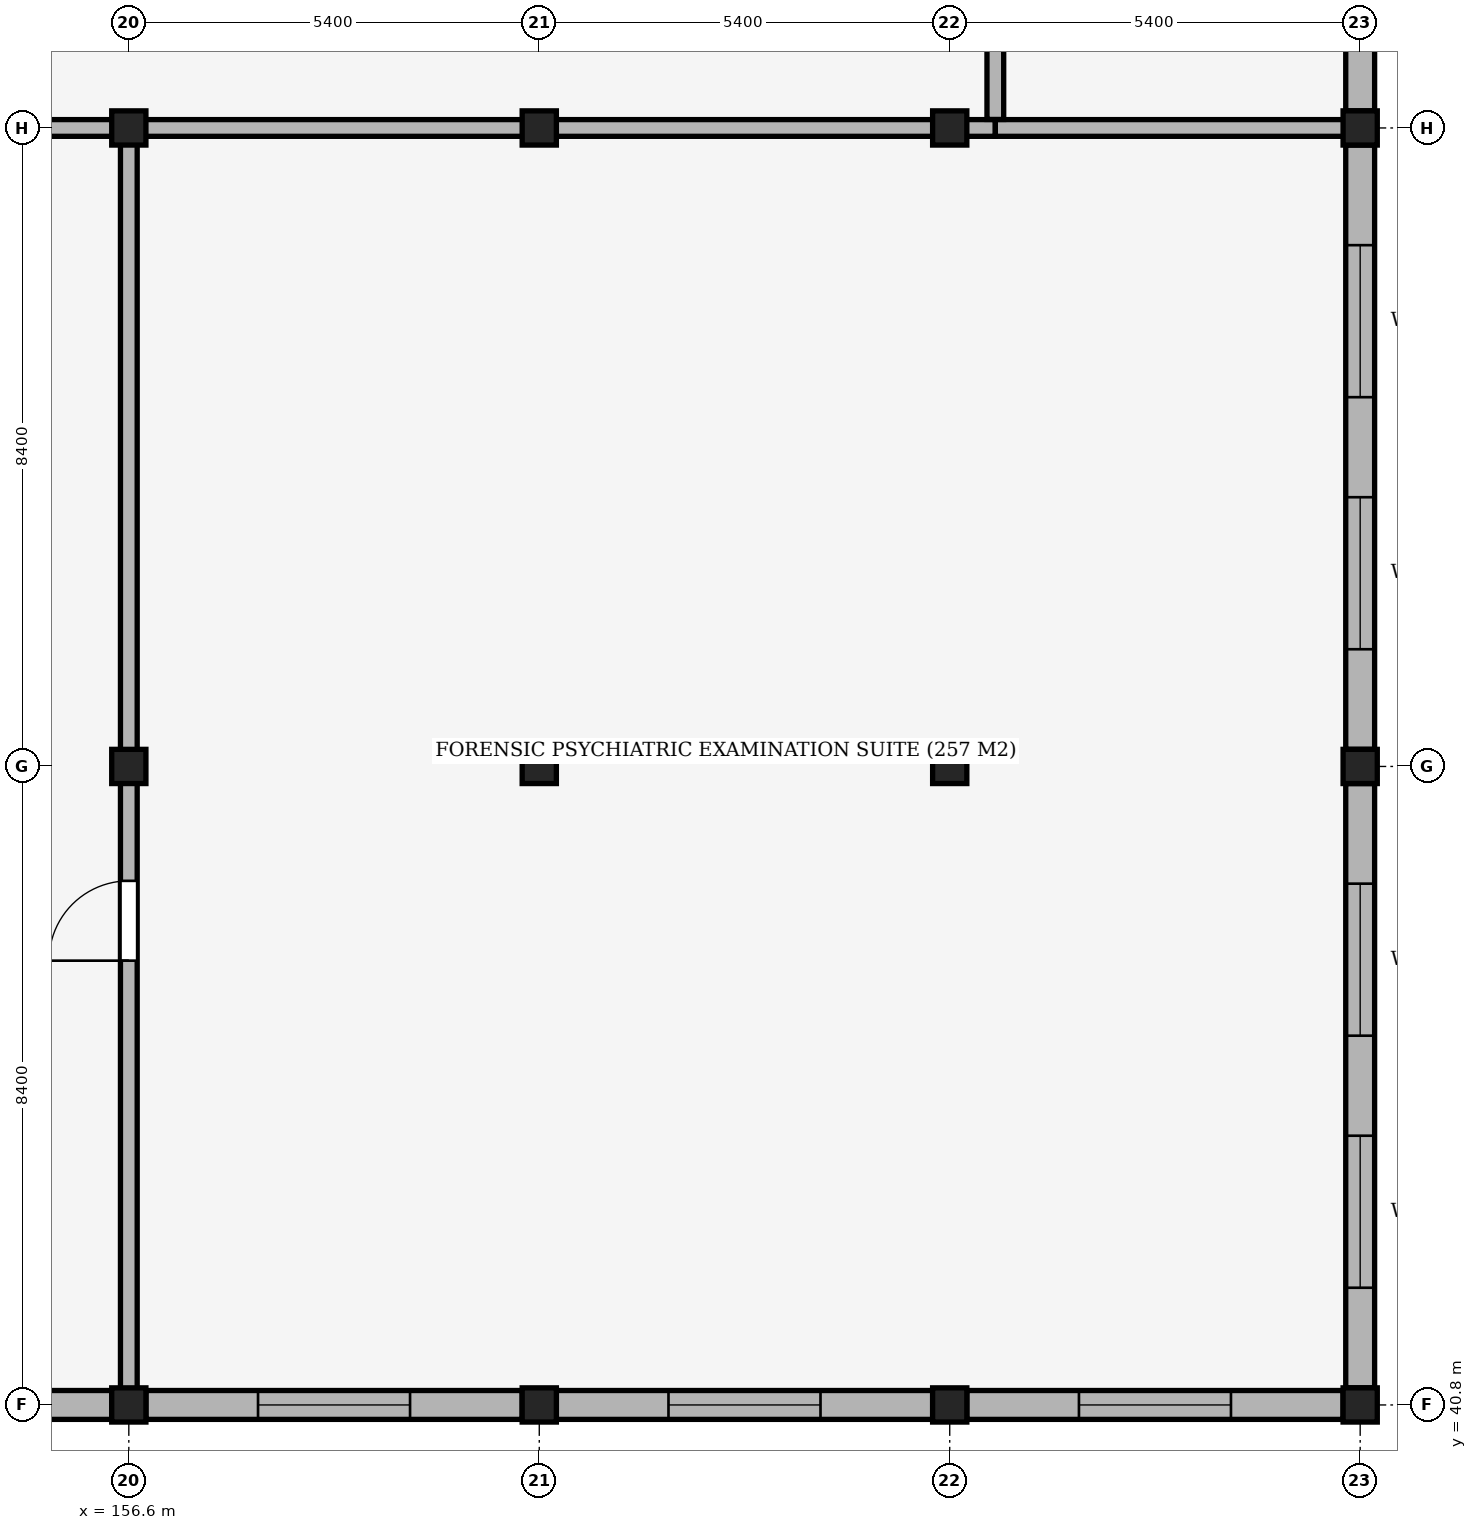
"""IFC4 building model, lengths in metres.
Left out: names, types, materials, properties, quantities, classifications, styles, units other than length and angle.
Written with IfcOpenShell. Run it as: python <this file> out.ifc"""

import sys

from ifc_helpers import new_model, si_unit, direction, frame, frame_2d, origin, origin_2d, place, context, subcontext, project, spatial, rectangle, extrude, element, fill, save


model = new_model("IFC4")
c1 = context("Model", 3, precision=1e-05, world=origin(), true_north=direction((0.0, 1.0)))
c2 = subcontext(c1, "Body", "Model", "MODEL_VIEW")
j1 = project(units=[si_unit("LENGTHUNIT", "METRE"), si_unit("PLANEANGLEUNIT", "RADIAN")], contexts=[c1])
p1 = place(None, origin())
s1 = spatial("IfcSite", under=j1, at=p1, CompositionType="ELEMENT")
p2 = place(p1, origin())
s2 = spatial("IfcBuilding", under=s1, at=p2, CompositionType="ELEMENT")
p3 = place(p2, frame((0.0, 0.0, 5.1)))
s3 = spatial("IfcBuildingStorey", under=s2, at=p3, CompositionType="ELEMENT", Elevation=5.1)
for number, where, z_axis, x_axis in (
    (1, (156.6, 40.8, 0.0), (0.0, 0.0, 1.0), (1.0, 0.0, 0.0)),
    (2, (156.6, 49.2, 0.0), (0.0, 0.0, 1.0), (1.0, 0.0, 0.0)),
    (3, (156.6, 57.6, 0.0), (0.0, 0.0, 1.0), (1.0, 0.0, 0.0)),
    (4, (162.0, 40.8, 0.0), (0.0, 0.0, 1.0), (1.0, 0.0, 0.0)),
    (5, (162.0, 49.2, 0.0), (0.0, 0.0, 1.0), (1.0, 0.0, 0.0)),
    (6, (162.0, 57.6, 0.0), (0.0, 0.0, 1.0), (1.0, 0.0, 0.0)),
    (7, (167.4, 40.8, 0.0), (0.0, 0.0, 1.0), (1.0, 0.0, 0.0)),
    (8, (167.4, 49.2, 0.0), (0.0, 0.0, 1.0), (1.0, 0.0, 0.0)),
    (9, (167.4, 57.6, 0.0), (0.0, 0.0, 1.0), (1.0, 0.0, 0.0)),
    (10, (172.8, 40.8, 0.0), (0.0, 0.0, 1.0), (1.0, 0.0, 0.0)),
    (11, (172.8, 49.2, 0.0), (0.0, 0.0, 1.0), (1.0, 0.0, 0.0)),
    (12, (172.8, 57.6, 0.0), (0.0, 0.0, 1.0), (1.0, 0.0, 0.0)),
):
    element("IfcColumn", number, at=place(p3, frame(where, z_axis=z_axis, x_axis=x_axis)), inside=s3, PredefinedType="COLUMN", context=c2, shape_type="SweptSolid", body=[
        extrude(rectangle(XDim=0.45, YDim=0.45, at=origin_2d()), origin(), (0.0, 0.0, 1.0), 5.1),
    ])
p4 = place(p3, frame((172.8, 65.775, 0.0), z_axis=(0.0, 0.0, 1.0), x_axis=(0.0, -1.0, 0.0)))
e13 = element("IfcWall", 13, at=p4, inside=s3, PredefinedType="SOLIDWALL", context=c2, shape_type="SweptSolid", body=[
    extrude(rectangle(XDim=7.95, YDim=0.38, at=frame_2d((3.975, 0.0))), origin(), (0.0, 0.0, 1.0), 4.02),
])
p5 = place(p4, frame((4.633, 0.0, 2.1)))
e14 = element("IfcOpeningElement", 14, at=p5, cuts=e13, PredefinedType="OPENING", context=c2, shape_type="SweptSolid", body=[
    extrude(rectangle(XDim=2.0, YDim=1.2, at=frame_2d((1.0, 0.6))), frame((0.0, 0.205, 0.0), z_axis=(0.0, -1.0, 0.0), x_axis=(1.0, 0.0, 0.0)), (0.0, 0.0, 1.0), 0.41),
])
p6 = place(p3, frame((172.8, 57.375, 0.0), z_axis=(0.0, 0.0, 1.0), x_axis=(0.0, -1.0, 0.0)))
e15 = element("IfcWall", 15, at=p6, inside=s3, PredefinedType="SOLIDWALL", context=c2, shape_type="SweptSolid", body=[
    extrude(rectangle(XDim=7.95, YDim=0.38, at=frame_2d((3.975, 0.0))), origin(), (0.0, 0.0, 1.0), 4.02),
])
p7 = place(p6, frame((1.317, 0.0, 2.1)))
e16 = element("IfcOpeningElement", 16, at=p7, cuts=e15, PredefinedType="OPENING", context=c2, shape_type="SweptSolid", body=[
    extrude(rectangle(XDim=2.0, YDim=1.2, at=frame_2d((1.0, 0.6))), frame((0.0, 0.205, 0.0), z_axis=(0.0, -1.0, 0.0), x_axis=(1.0, 0.0, 0.0)), (0.0, 0.0, 1.0), 0.41),
])
p8 = place(p6, frame((4.633, 0.0, 2.1)))
e17 = element("IfcOpeningElement", 17, at=p8, cuts=e15, PredefinedType="OPENING", context=c2, shape_type="SweptSolid", body=[
    extrude(rectangle(XDim=2.0, YDim=1.2, at=frame_2d((1.0, 0.6))), frame((0.0, 0.205, 0.0), z_axis=(0.0, -1.0, 0.0), x_axis=(1.0, 0.0, 0.0)), (0.0, 0.0, 1.0), 0.41),
])
p9 = place(p3, frame((172.8, 48.975, 0.0), z_axis=(0.0, 0.0, 1.0), x_axis=(0.0, -1.0, 0.0)))
e18 = element("IfcWall", 18, at=p9, inside=s3, PredefinedType="SOLIDWALL", context=c2, shape_type="SweptSolid", body=[
    extrude(rectangle(XDim=7.95, YDim=0.38, at=frame_2d((3.975, 0.0))), origin(), (0.0, 0.0, 1.0), 4.02),
])
p10 = place(p9, frame((1.317, 0.0, 2.1)))
e19 = element("IfcOpeningElement", 19, at=p10, cuts=e18, PredefinedType="OPENING", context=c2, shape_type="SweptSolid", body=[
    extrude(rectangle(XDim=2.0, YDim=1.2, at=frame_2d((1.0, 0.6))), frame((0.0, 0.205, 0.0), z_axis=(0.0, -1.0, 0.0), x_axis=(1.0, 0.0, 0.0)), (0.0, 0.0, 1.0), 0.41),
])
p11 = place(p9, frame((4.633, 0.0, 2.1)))
e20 = element("IfcOpeningElement", 20, at=p11, cuts=e18, PredefinedType="OPENING", context=c2, shape_type="SweptSolid", body=[
    extrude(rectangle(XDim=2.0, YDim=1.2, at=frame_2d((1.0, 0.6))), frame((0.0, 0.205, 0.0), z_axis=(0.0, -1.0, 0.0), x_axis=(1.0, 0.0, 0.0)), (0.0, 0.0, 1.0), 0.41),
])
p12 = place(p3, frame((172.575, 40.8, 0.0), z_axis=(0.0, 0.0, 1.0), x_axis=(-1.0, 0.0, 0.0)))
e21 = element("IfcWall", 21, at=p12, inside=s3, PredefinedType="SOLIDWALL", context=c2, shape_type="SweptSolid", body=[
    extrude(rectangle(XDim=4.95, YDim=0.38, at=frame_2d((2.475, 0.0))), origin(), (0.0, 0.0, 1.0), 4.22),
])
p13 = place(p12, frame((1.475, 0.0, 2.1)))
e22 = element("IfcOpeningElement", 22, at=p13, cuts=e21, PredefinedType="OPENING", context=c2, shape_type="SweptSolid", body=[
    extrude(rectangle(XDim=2.0, YDim=1.2, at=frame_2d((1.0, 0.6))), frame((0.0, 0.205, 0.0), z_axis=(0.0, -1.0, 0.0), x_axis=(1.0, 0.0, 0.0)), (0.0, 0.0, 1.0), 0.41),
])
p14 = place(p3, frame((167.175, 40.8, 0.0), z_axis=(0.0, 0.0, 1.0), x_axis=(-1.0, 0.0, 0.0)))
e23 = element("IfcWall", 23, at=p14, inside=s3, PredefinedType="SOLIDWALL", context=c2, shape_type="SweptSolid", body=[
    extrude(rectangle(XDim=4.95, YDim=0.38, at=frame_2d((2.475, 0.0))), origin(), (0.0, 0.0, 1.0), 4.22),
])
p15 = place(p14, frame((1.475, 0.0, 2.1)))
e24 = element("IfcOpeningElement", 24, at=p15, cuts=e23, PredefinedType="OPENING", context=c2, shape_type="SweptSolid", body=[
    extrude(rectangle(XDim=2.0, YDim=1.2, at=frame_2d((1.0, 0.6))), frame((0.0, 0.205, 0.0), z_axis=(0.0, -1.0, 0.0), x_axis=(1.0, 0.0, 0.0)), (0.0, 0.0, 1.0), 0.41),
])
p16 = place(p3, frame((161.775, 40.8, 0.0), z_axis=(0.0, 0.0, 1.0), x_axis=(-1.0, 0.0, 0.0)))
e25 = element("IfcWall", 25, at=p16, inside=s3, PredefinedType="SOLIDWALL", context=c2, shape_type="SweptSolid", body=[
    extrude(rectangle(XDim=4.95, YDim=0.38, at=frame_2d((2.475, 0.0))), origin(), (0.0, 0.0, 1.0), 4.22),
])
p17 = place(p16, frame((1.475, 0.0, 2.1)))
e26 = element("IfcOpeningElement", 26, at=p17, cuts=e25, PredefinedType="OPENING", context=c2, shape_type="SweptSolid", body=[
    extrude(rectangle(XDim=2.0, YDim=1.2, at=frame_2d((1.0, 0.6))), frame((0.0, 0.205, 0.0), z_axis=(0.0, -1.0, 0.0), x_axis=(1.0, 0.0, 0.0)), (0.0, 0.0, 1.0), 0.41),
])
p18 = place(p3, frame((156.375, 40.8, 0.0), z_axis=(0.0, 0.0, 1.0), x_axis=(-1.0, 0.0, 0.0)))
e27 = element("IfcWall", 27, at=p18, inside=s3, PredefinedType="SOLIDWALL", context=c2, shape_type="SweptSolid", body=[
    extrude(rectangle(XDim=4.95, YDim=0.38, at=frame_2d((2.475, 0.0))), origin(), (0.0, 0.0, 1.0), 4.07),
])
p19 = place(p18, frame((1.475, 0.0, 2.1)))
e28 = element("IfcOpeningElement", 28, at=p19, cuts=e27, PredefinedType="OPENING", context=c2, shape_type="SweptSolid", body=[
    extrude(rectangle(XDim=2.0, YDim=1.2, at=frame_2d((1.0, 0.6))), frame((0.0, 0.205, 0.0), z_axis=(0.0, -1.0, 0.0), x_axis=(1.0, 0.0, 0.0)), (0.0, 0.0, 1.0), 0.41),
])
p20 = place(p3, frame((138.4, 57.6, 0.0), z_axis=(0.0, 0.0, 1.0), x_axis=(1.0, 0.0, 0.0)))
e29 = element("IfcWall", 29, at=p20, inside=s3, PredefinedType="PARTITIONING", context=c2, shape_type="SweptSolid", body=[
    extrude(rectangle(XDim=18.2, YDim=0.22, at=frame_2d((9.1, 0.0))), origin(), (0.0, 0.0, 1.0), 4.02),
])
p21 = place(p3, frame((156.6, 57.6, 0.0), z_axis=(0.0, 0.0, 1.0), x_axis=(1.0, 0.0, 0.0)))
e30 = element("IfcWall", 30, at=p21, inside=s3, PredefinedType="PARTITIONING", context=c2, shape_type="SweptSolid", body=[
    extrude(rectangle(XDim=11.4, YDim=0.22, at=frame_2d((5.7, 0.0))), origin(), (0.0, 0.0, 1.0), 4.02),
])
p22 = place(p3, frame((168.0, 57.6, 0.0), z_axis=(0.0, 0.0, 1.0), x_axis=(1.0, 0.0, 0.0)))
e31 = element("IfcWall", 31, at=p22, inside=s3, PredefinedType="PARTITIONING", context=c2, shape_type="SweptSolid", body=[
    extrude(rectangle(XDim=4.741, YDim=0.22, at=frame_2d((2.371, 0.0))), origin(), (0.0, 0.0, 1.0), 4.02),
])
p23 = place(p3, frame((156.6, 40.853, 0.0), z_axis=(0.0, 0.0, 1.0), x_axis=(0.0, 1.0, 0.0)))
e32 = element("IfcWall", 32, at=p23, inside=s3, PredefinedType="PARTITIONING", context=c2, shape_type="SweptSolid", body=[
    extrude(rectangle(XDim=16.635, YDim=0.22, at=frame_2d((8.317, 0.0))), origin(), (0.0, 0.0, 1.0), 4.02),
])
p24 = place(p23, frame((5.792, 0.0, 0.0)))
e33 = element("IfcOpeningElement", 33, at=p24, cuts=e32, PredefinedType="OPENING", context=c2, shape_type="SweptSolid", body=[
    extrude(rectangle(XDim=1.05, YDim=2.15, at=frame_2d((0.525, 1.075))), frame((0.0, 0.125, 0.0), z_axis=(0.0, -1.0, 0.0), x_axis=(1.0, 0.0, 0.0)), (0.0, 0.0, 1.0), 0.25),
])
p25 = place(p3, frame((168.0, 57.712, 0.0), z_axis=(0.0, 0.0, 1.0), x_axis=(0.0, 1.0, 0.0)))
e34 = element("IfcWall", 34, at=p25, inside=s3, PredefinedType="PARTITIONING", context=c2, shape_type="SweptSolid", body=[
    extrude(rectangle(XDim=4.776, YDim=0.22, at=frame_2d((2.388, 0.0))), origin(), (0.0, 0.0, 1.0), 4.22),
])
p26 = place(p25, frame((1.938, 0.0, 0.0)))
e35 = element("IfcOpeningElement", 35, at=p26, cuts=e34, PredefinedType="OPENING", context=c2, shape_type="SweptSolid", body=[
    extrude(rectangle(XDim=0.9, YDim=2.1, at=frame_2d((0.45, 1.05))), frame((0.0, 0.125, 0.0), z_axis=(0.0, -1.0, 0.0), x_axis=(1.0, 0.0, 0.0)), (0.0, 0.0, 1.0), 0.25),
])
p27 = place(p7, origin())
e36 = element("IfcWindow", 36, at=p27, inside=s3, PartitioningType="SINGLE_PANEL", PredefinedType="WINDOW", context=c2, shape_type="SweptSolid", body=[
    extrude(rectangle(XDim=2.0, YDim=1.2, at=frame_2d((1.0, 0.6))), frame((0.0, 0.03, 0.0), z_axis=(0.0, -1.0, 0.0), x_axis=(1.0, 0.0, 0.0)), (0.0, 0.0, 1.0), 0.06),
])
fill(e16, e36)
p28 = place(p8, origin())
e37 = element("IfcWindow", 37, at=p28, inside=s3, PartitioningType="SINGLE_PANEL", PredefinedType="WINDOW", context=c2, shape_type="SweptSolid", body=[
    extrude(rectangle(XDim=2.0, YDim=1.2, at=frame_2d((1.0, 0.6))), frame((0.0, 0.03, 0.0), z_axis=(0.0, -1.0, 0.0), x_axis=(1.0, 0.0, 0.0)), (0.0, 0.0, 1.0), 0.06),
])
fill(e17, e37)
p29 = place(p10, origin())
e38 = element("IfcWindow", 38, at=p29, inside=s3, PartitioningType="SINGLE_PANEL", PredefinedType="WINDOW", context=c2, shape_type="SweptSolid", body=[
    extrude(rectangle(XDim=2.0, YDim=1.2, at=frame_2d((1.0, 0.6))), frame((0.0, 0.03, 0.0), z_axis=(0.0, -1.0, 0.0), x_axis=(1.0, 0.0, 0.0)), (0.0, 0.0, 1.0), 0.06),
])
fill(e19, e38)
p30 = place(p11, origin())
e39 = element("IfcWindow", 39, at=p30, inside=s3, PartitioningType="SINGLE_PANEL", PredefinedType="WINDOW", context=c2, shape_type="SweptSolid", body=[
    extrude(rectangle(XDim=2.0, YDim=1.2, at=frame_2d((1.0, 0.6))), frame((0.0, 0.03, 0.0), z_axis=(0.0, -1.0, 0.0), x_axis=(1.0, 0.0, 0.0)), (0.0, 0.0, 1.0), 0.06),
])
fill(e20, e39)
p31 = place(p13, origin())
e40 = element("IfcWindow", 40, at=p31, inside=s3, PartitioningType="SINGLE_PANEL", PredefinedType="WINDOW", context=c2, shape_type="SweptSolid", body=[
    extrude(rectangle(XDim=2.0, YDim=1.2, at=frame_2d((1.0, 0.6))), frame((0.0, 0.03, 0.0), z_axis=(0.0, -1.0, 0.0), x_axis=(1.0, 0.0, 0.0)), (0.0, 0.0, 1.0), 0.06),
])
fill(e22, e40)
p32 = place(p15, origin())
e41 = element("IfcWindow", 41, at=p32, inside=s3, PartitioningType="SINGLE_PANEL", PredefinedType="WINDOW", context=c2, shape_type="SweptSolid", body=[
    extrude(rectangle(XDim=2.0, YDim=1.2, at=frame_2d((1.0, 0.6))), frame((0.0, 0.03, 0.0), z_axis=(0.0, -1.0, 0.0), x_axis=(1.0, 0.0, 0.0)), (0.0, 0.0, 1.0), 0.06),
])
fill(e24, e41)
p33 = place(p17, origin())
e42 = element("IfcWindow", 42, at=p33, inside=s3, PartitioningType="SINGLE_PANEL", PredefinedType="WINDOW", context=c2, shape_type="SweptSolid", body=[
    extrude(rectangle(XDim=2.0, YDim=1.2, at=frame_2d((1.0, 0.6))), frame((0.0, 0.03, 0.0), z_axis=(0.0, -1.0, 0.0), x_axis=(1.0, 0.0, 0.0)), (0.0, 0.0, 1.0), 0.06),
])
fill(e26, e42)
p34 = place(p24, origin())
e43 = element("IfcDoor", 43, at=p34, inside=s3, OperationType="SINGLE_SWING_LEFT", PredefinedType="DOOR", context=c2, shape_type="SweptSolid", body=[
    extrude(rectangle(XDim=1.05, YDim=2.15, at=frame_2d((0.525, 1.075))), frame((0.0, 0.025, 0.0), z_axis=(0.0, -1.0, 0.0), x_axis=(1.0, 0.0, 0.0)), (0.0, 0.0, 1.0), 0.05),
])
fill(e33, e43)
save(model, sys.argv[1])
